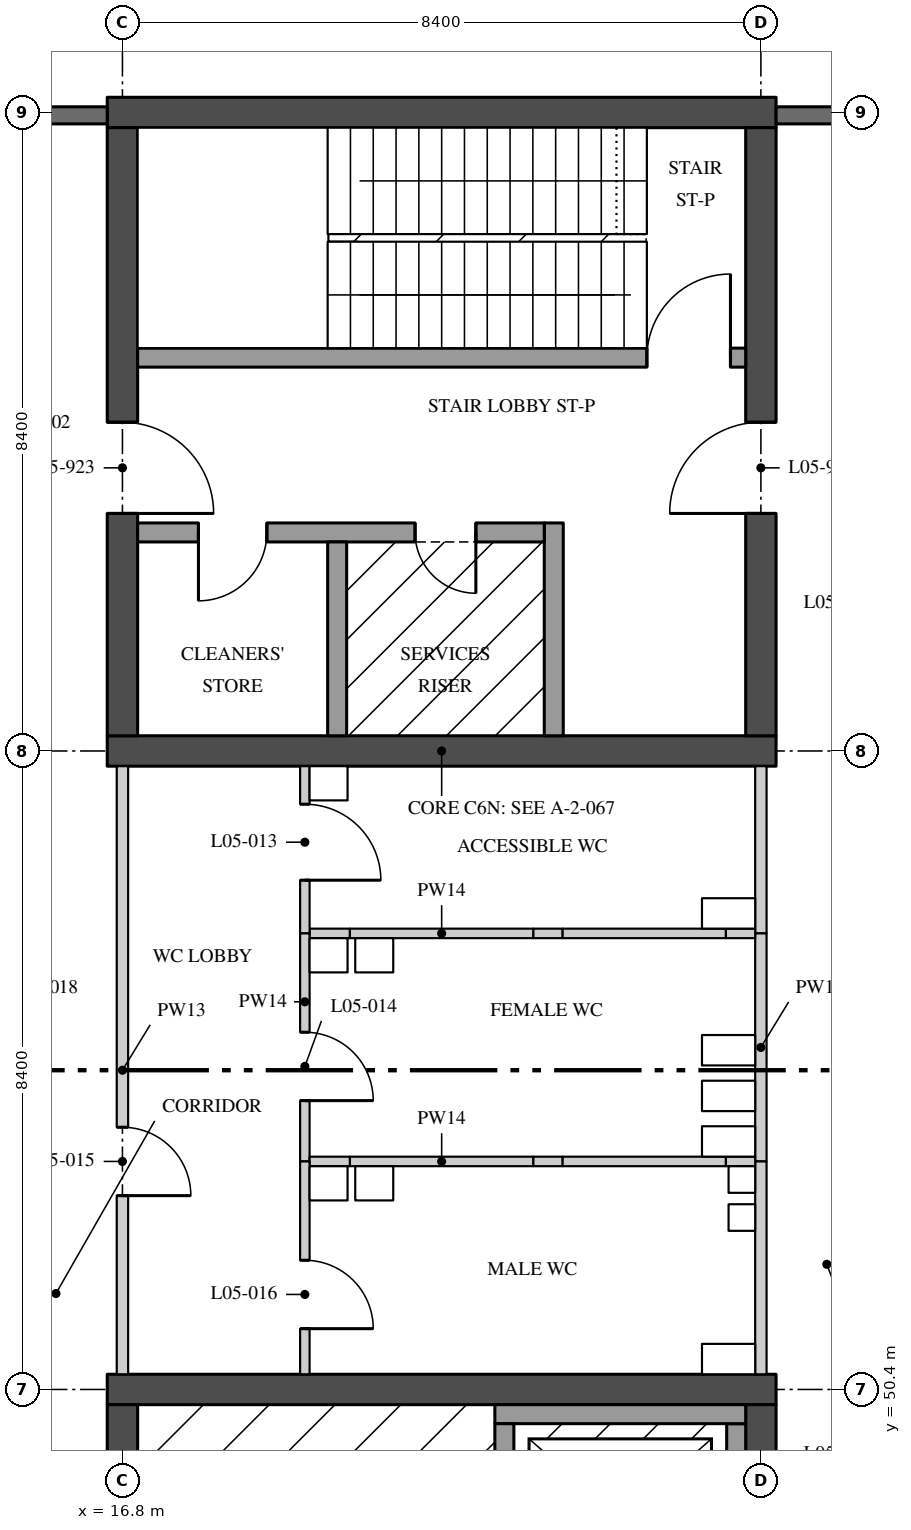
"""IFC4 building model, lengths in metres.
Left out: names, types, materials, properties, quantities, classifications, styles, units other than length and angle.
Written with IfcOpenShell. Run it as: python <this file> out.ifc"""

import sys

from ifc_helpers import new_model, si_unit, direction, frame, frame_2d, origin, place, context, subcontext, project, spatial, rectangle, extrude, element, fill, save


model = new_model("IFC4")
c1 = context("Model", 3, precision=1e-05, world=origin(), true_north=direction((0.0, 1.0)))
c2 = subcontext(c1, "Body", "Model", "MODEL_VIEW")
j1 = project(units=[si_unit("LENGTHUNIT", "METRE"), si_unit("PLANEANGLEUNIT", "RADIAN")], contexts=[c1])
p1 = place(None, origin())
s1 = spatial("IfcSite", under=j1, at=p1, CompositionType="ELEMENT")
p2 = place(p1, origin())
s2 = spatial("IfcBuilding", under=s1, at=p2, CompositionType="ELEMENT")
p3 = place(p2, frame((0.0, 0.0, 23.4)))
s3 = spatial("IfcBuildingStorey", under=s2, at=p3, CompositionType="ELEMENT", Elevation=23.4)
p4 = place(p3, frame((16.6, 50.4, 0.0), z_axis=(0.0, 0.0, 1.0), x_axis=(1.0, 0.0, 0.0)))
e1 = element("IfcWall", 1, at=p4, inside=s3, PredefinedType="SHEAR", context=c2, shape_type="SweptSolid", body=[
    extrude(rectangle(XDim=8.8, YDim=0.4, at=frame_2d((4.4, 0.0))), origin(), (0.0, 0.0, 1.0), 4.37),
])
p5 = place(p3, frame((16.8, 42.2, 0.0), z_axis=(0.0, 0.0, 1.0), x_axis=(0.0, 1.0, 0.0)))
e2 = element("IfcWall", 2, at=p5, inside=s3, PredefinedType="SHEAR", context=c2, shape_type="SweptSolid", body=[
    extrude(rectangle(XDim=8.0, YDim=0.4, at=frame_2d((4.0, 0.0))), origin(), (0.0, 0.0, 1.0), 4.37),
])
p6 = place(p5, frame((3.55, 0.0, 0.0)))
e3 = element("IfcOpeningElement", 3, at=p6, cuts=e2, PredefinedType="OPENING", context=c2, shape_type="SweptSolid", body=[
    extrude(rectangle(XDim=1.2, YDim=2.1, at=frame_2d((0.6, 1.05))), frame((0.0, 0.21, 0.0), z_axis=(0.0, -1.0, 0.0), x_axis=(1.0, 0.0, 0.0)), (0.0, 0.0, 1.0), 0.42),
])
p7 = place(p5, frame((0.8, 0.0, 0.0)))
e4 = element("IfcOpeningElement", 4, at=p7, cuts=e2, PredefinedType="OPENING", context=c2, shape_type="SweptSolid", body=[
    extrude(rectangle(XDim=1.2, YDim=2.1, at=frame_2d((0.6, 1.05))), frame((0.0, 0.21, 0.0), z_axis=(0.0, -1.0, 0.0), x_axis=(1.0, 0.0, 0.0)), (0.0, 0.0, 1.0), 0.42),
])
p8 = place(p3, frame((25.2, 42.2, 0.0), z_axis=(0.0, 0.0, 1.0), x_axis=(0.0, 1.0, 0.0)))
e5 = element("IfcWall", 5, at=p8, inside=s3, PredefinedType="SHEAR", context=c2, shape_type="SweptSolid", body=[
    extrude(rectangle(XDim=8.0, YDim=0.4, at=frame_2d((4.0, 0.0))), origin(), (0.0, 0.0, 1.0), 4.37),
])
p9 = place(p8, frame((3.55, 0.0, 0.0)))
e6 = element("IfcOpeningElement", 6, at=p9, cuts=e5, PredefinedType="OPENING", context=c2, shape_type="SweptSolid", body=[
    extrude(rectangle(XDim=1.2, YDim=2.1, at=frame_2d((0.6, 1.05))), frame((0.0, 0.21, 0.0), z_axis=(0.0, -1.0, 0.0), x_axis=(1.0, 0.0, 0.0)), (0.0, 0.0, 1.0), 0.42),
])
for number, where, z_axis, x_axis in (
    (7, (16.6, 58.8, 0.0), (0.0, 0.0, 1.0), (1.0, 0.0, 0.0)),
    (8, (16.6, 67.2, 0.0), (0.0, 0.0, 1.0), (1.0, 0.0, 0.0)),
):
    element("IfcWall", number, at=place(p3, frame(where, z_axis=z_axis, x_axis=x_axis)), inside=s3, PredefinedType="SHEAR", context=c2, shape_type="SweptSolid", body=[
        extrude(rectangle(XDim=8.8, YDim=0.4, at=frame_2d((4.4, 0.0))), origin(), (0.0, 0.0, 1.0), 4.37),
    ])
p10 = place(p3, frame((16.8, 59.0, 0.0), z_axis=(0.0, 0.0, 1.0), x_axis=(0.0, 1.0, 0.0)))
e9 = element("IfcWall", 9, at=p10, inside=s3, PredefinedType="SHEAR", context=c2, shape_type="SweptSolid", body=[
    extrude(rectangle(XDim=8.0, YDim=0.4, at=frame_2d((4.0, 0.0))), origin(), (0.0, 0.0, 1.0), 4.37),
])
p11 = place(p10, frame((2.925, 0.0, 0.0)))
e10 = element("IfcOpeningElement", 10, at=p11, cuts=e9, PredefinedType="OPENING", context=c2, shape_type="SweptSolid", body=[
    extrude(rectangle(XDim=1.2, YDim=2.1, at=frame_2d((0.6, 1.05))), frame((0.0, 0.21, 0.0), z_axis=(0.0, -1.0, 0.0), x_axis=(1.0, 0.0, 0.0)), (0.0, 0.0, 1.0), 0.42),
])
p12 = place(p3, frame((25.2, 59.0, 0.0), z_axis=(0.0, 0.0, 1.0), x_axis=(0.0, 1.0, 0.0)))
e11 = element("IfcWall", 11, at=p12, inside=s3, PredefinedType="SHEAR", context=c2, shape_type="SweptSolid", body=[
    extrude(rectangle(XDim=8.0, YDim=0.4, at=frame_2d((4.0, 0.0))), origin(), (0.0, 0.0, 1.0), 4.37),
])
p13 = place(p12, frame((2.925, 0.0, 0.0)))
e12 = element("IfcOpeningElement", 12, at=p13, cuts=e11, PredefinedType="OPENING", context=c2, shape_type="SweptSolid", body=[
    extrude(rectangle(XDim=1.2, YDim=2.1, at=frame_2d((0.6, 1.05))), frame((0.0, 0.21, 0.0), z_axis=(0.0, -1.0, 0.0), x_axis=(1.0, 0.0, 0.0)), (0.0, 0.0, 1.0), 0.42),
])
p14 = place(p3, frame((25.0, 63.975, 0.0), z_axis=(0.0, 0.0, 1.0), x_axis=(-1.0, 0.0, 0.0)))
e13 = element("IfcWall", 13, at=p14, inside=s3, PredefinedType="SOLIDWALL", context=c2, shape_type="SweptSolid", body=[
    extrude(rectangle(XDim=8.0, YDim=0.25, at=frame_2d((4.0, 0.0))), origin(), (0.0, 0.0, 1.0), 4.37),
])
p15 = place(p14, frame((0.2, 0.0, 0.0)))
e14 = element("IfcOpeningElement", 14, at=p15, cuts=e13, PredefinedType="OPENING", context=c2, shape_type="SweptSolid", body=[
    extrude(rectangle(XDim=1.1, YDim=2.1, at=frame_2d((0.55, 1.05))), frame((0.0, 0.135, 0.0), z_axis=(0.0, -1.0, 0.0), x_axis=(1.0, 0.0, 0.0)), (0.0, 0.0, 1.0), 0.27),
])
p16 = place(p3, frame((22.475, 61.8, 0.0), z_axis=(0.0, 0.0, 1.0), x_axis=(0.0, -1.0, 0.0)))
e15 = element("IfcWall", 15, at=p16, inside=s3, PredefinedType="SOLIDWALL", context=c2, shape_type="SweptSolid", body=[
    extrude(rectangle(XDim=2.8, YDim=0.25, at=frame_2d((1.4, 0.0))), origin(), (0.0, 0.0, 1.0), 4.37),
])
p17 = place(p3, frame((22.35, 61.675, 0.0), z_axis=(0.0, 0.0, 1.0), x_axis=(-1.0, 0.0, 0.0)))
e16 = element("IfcWall", 16, at=p17, inside=s3, PredefinedType="SOLIDWALL", context=c2, shape_type="SweptSolid", body=[
    extrude(rectangle(XDim=5.35, YDim=0.25, at=frame_2d((2.675, 0.0))), origin(), (0.0, 0.0, 1.0), 4.37),
])
p18 = place(p17, frame((3.65, 0.0, 0.0)))
e17 = element("IfcOpeningElement", 17, at=p18, cuts=e16, PredefinedType="OPENING", context=c2, shape_type="SweptSolid", body=[
    extrude(rectangle(XDim=0.9, YDim=2.1, at=frame_2d((0.45, 1.05))), frame((0.0, 0.135, 0.0), z_axis=(0.0, -1.0, 0.0), x_axis=(1.0, 0.0, 0.0)), (0.0, 0.0, 1.0), 0.27),
])
p19 = place(p17, frame((0.9, 0.0, 0.0)))
e18 = element("IfcOpeningElement", 18, at=p19, cuts=e16, PredefinedType="OPENING", context=c2, shape_type="SweptSolid", body=[
    extrude(rectangle(XDim=0.8, YDim=2.1, at=frame_2d((0.4, 1.05))), frame((0.0, 0.135, 0.0), z_axis=(0.0, -1.0, 0.0), x_axis=(1.0, 0.0, 0.0)), (0.0, 0.0, 1.0), 0.27),
])
p20 = place(p3, frame((19.625, 61.55, 0.0), z_axis=(0.0, 0.0, 1.0), x_axis=(0.0, -1.0, 0.0)))
e19 = element("IfcWall", 19, at=p20, inside=s3, PredefinedType="SOLIDWALL", context=c2, shape_type="SweptSolid", body=[
    extrude(rectangle(XDim=2.55, YDim=0.25, at=frame_2d((1.275, 0.0))), origin(), (0.0, 0.0, 1.0), 4.37),
])
p21 = place(p3, frame((24.875, 47.65, 0.0), z_axis=(0.0, 0.0, 1.0), x_axis=(0.0, 1.0, 0.0)))
e20 = element("IfcWall", 20, at=p21, inside=s3, PredefinedType="SOLIDWALL", context=c2, shape_type="SweptSolid", body=[
    extrude(rectangle(XDim=2.3, YDim=0.25, at=frame_2d((1.15, 0.0))), origin(), (0.0, 0.0, 1.0), 4.37),
])
p22 = place(p3, frame((21.7, 50.075, 0.0), z_axis=(0.0, 0.0, 1.0), x_axis=(1.0, 0.0, 0.0)))
e21 = element("IfcWall", 21, at=p22, inside=s3, PredefinedType="SOLIDWALL", context=c2, shape_type="SweptSolid", body=[
    extrude(rectangle(XDim=3.3, YDim=0.25, at=frame_2d((1.65, 0.0))), origin(), (0.0, 0.0, 1.0), 4.37),
])
p23 = place(p3, frame((21.825, 47.65, 0.0), z_axis=(0.0, 0.0, 1.0), x_axis=(0.0, 1.0, 0.0)))
e22 = element("IfcWall", 22, at=p23, inside=s3, PredefinedType="SOLIDWALL", context=c2, shape_type="SweptSolid", body=[
    extrude(rectangle(XDim=2.3, YDim=0.25, at=frame_2d((1.15, 0.0))), origin(), (0.0, 0.0, 1.0), 4.37),
])
p24 = place(p3, frame((25.2, 56.4, 0.0), z_axis=(0.0, 0.0, 1.0), x_axis=(0.0, 1.0, 0.0)))
e23 = element("IfcWall", 23, at=p24, inside=s3, PredefinedType="PARTITIONING", context=c2, shape_type="SweptSolid", body=[
    extrude(rectangle(XDim=2.2, YDim=0.15, at=frame_2d((1.1, 0.0))), origin(), (0.0, 0.0, 1.0), 3.817),
])
p25 = place(p3, frame((25.2, 53.4, 0.0), z_axis=(0.0, 0.0, 1.0), x_axis=(0.0, 1.0, 0.0)))
e24 = element("IfcWall", 24, at=p25, inside=s3, PredefinedType="PARTITIONING", context=c2, shape_type="SweptSolid", body=[
    extrude(rectangle(XDim=3.0, YDim=0.15, at=frame_2d((1.5, 0.0))), origin(), (0.0, 0.0, 1.0), 3.817),
])
p26 = place(p3, frame((25.2, 50.6, 0.0), z_axis=(0.0, 0.0, 1.0), x_axis=(0.0, 1.0, 0.0)))
e25 = element("IfcWall", 25, at=p26, inside=s3, PredefinedType="PARTITIONING", context=c2, shape_type="SweptSolid", body=[
    extrude(rectangle(XDim=2.8, YDim=0.15, at=frame_2d((1.4, 0.0))), origin(), (0.0, 0.0, 1.0), 3.817),
])
p27 = place(p3, frame((16.8, 50.6, 0.0), z_axis=(0.0, 0.0, 1.0), x_axis=(0.0, 1.0, 0.0)))
e26 = element("IfcWall", 26, at=p27, inside=s3, PredefinedType="PARTITIONING", context=c2, shape_type="SweptSolid", body=[
    extrude(rectangle(XDim=8.0, YDim=0.15, at=frame_2d((4.0, 0.0))), origin(), (0.0, 0.0, 1.0), 3.817),
])
p28 = place(p27, frame((2.35, 0.0, 0.0)))
e27 = element("IfcOpeningElement", 27, at=p28, cuts=e26, PredefinedType="OPENING", context=c2, shape_type="SweptSolid", body=[
    extrude(rectangle(XDim=0.9, YDim=2.1, at=frame_2d((0.45, 1.05))), frame((0.0, 0.085, 0.0), z_axis=(0.0, -1.0, 0.0), x_axis=(1.0, 0.0, 0.0)), (0.0, 0.0, 1.0), 0.17),
])
p29 = place(p3, frame((19.262, 56.4, 0.0), z_axis=(0.0, 0.0, 1.0), x_axis=(1.0, 0.0, 0.0)))
e28 = element("IfcWall", 28, at=p29, inside=s3, PredefinedType="PARTITIONING", context=c2, shape_type="SweptSolid", body=[
    extrude(rectangle(XDim=0.531, YDim=0.125, at=frame_2d((0.266, 0.0))), origin(), (0.0, 0.0, 1.0), 3.946),
])
p30 = place(p3, frame((19.793, 56.4, 0.0), z_axis=(0.0, 0.0, 1.0), x_axis=(1.0, 0.0, 0.0)))
e29 = element("IfcWall", 29, at=p30, inside=s3, PredefinedType="PARTITIONING", context=c2, shape_type="SweptSolid", body=[
    extrude(rectangle(XDim=2.414, YDim=0.125, at=frame_2d((1.207, 0.0))), origin(), (0.0, 0.0, 1.0), 4.37),
])
p31 = place(p3, frame((22.207, 56.4, 0.0), z_axis=(0.0, 0.0, 1.0), x_axis=(1.0, 0.0, 0.0)))
e30 = element("IfcWall", 30, at=p31, inside=s3, PredefinedType="PARTITIONING", context=c2, shape_type="SweptSolid", body=[
    extrude(rectangle(XDim=0.385, YDim=0.125, at=frame_2d((0.192, 0.0))), origin(), (0.0, 0.0, 1.0), 3.946),
])
p32 = place(p3, frame((22.592, 56.4, 0.0), z_axis=(0.0, 0.0, 1.0), x_axis=(1.0, 0.0, 0.0)))
e31 = element("IfcWall", 31, at=p32, inside=s3, PredefinedType="PARTITIONING", context=c2, shape_type="SweptSolid", body=[
    extrude(rectangle(XDim=2.148, YDim=0.125, at=frame_2d((1.074, 0.0))), origin(), (0.0, 0.0, 1.0), 4.37),
])
p33 = place(p3, frame((24.74, 56.4, 0.0), z_axis=(0.0, 0.0, 1.0), x_axis=(1.0, 0.0, 0.0)))
e32 = element("IfcWall", 32, at=p33, inside=s3, PredefinedType="PARTITIONING", context=c2, shape_type="SweptSolid", body=[
    extrude(rectangle(XDim=0.385, YDim=0.125, at=frame_2d((0.192, 0.0))), origin(), (0.0, 0.0, 1.0), 3.817),
])
p34 = place(p3, frame((19.2, 56.4, 0.0), z_axis=(0.0, 0.0, 1.0), x_axis=(0.0, 1.0, 0.0)))
e33 = element("IfcWall", 33, at=p34, inside=s3, PredefinedType="PARTITIONING", context=c2, shape_type="SweptSolid", body=[
    extrude(rectangle(XDim=2.2, YDim=0.125, at=frame_2d((1.1, 0.0))), origin(), (0.0, 0.0, 1.0), 4.37),
])
p35 = place(p34, frame((0.7, 0.0, 0.0)))
e34 = element("IfcOpeningElement", 34, at=p35, cuts=e33, PredefinedType="OPENING", context=c2, shape_type="SweptSolid", body=[
    extrude(rectangle(XDim=1.0, YDim=2.1, at=frame_2d((0.5, 1.05))), frame((0.0, 0.073, 0.0), z_axis=(0.0, -1.0, 0.0), x_axis=(1.0, 0.0, 0.0)), (0.0, 0.0, 1.0), 0.145),
])
p36 = place(p3, frame((19.2, 53.4, 0.0), z_axis=(0.0, 0.0, 1.0), x_axis=(0.0, 1.0, 0.0)))
e35 = element("IfcWall", 35, at=p36, inside=s3, PredefinedType="PARTITIONING", context=c2, shape_type="SweptSolid", body=[
    extrude(rectangle(XDim=3.0, YDim=0.125, at=frame_2d((1.5, 0.0))), origin(), (0.0, 0.0, 1.0), 4.37),
])
p37 = place(p36, frame((0.8, 0.0, 0.0)))
e36 = element("IfcOpeningElement", 36, at=p37, cuts=e35, PredefinedType="OPENING", context=c2, shape_type="SweptSolid", body=[
    extrude(rectangle(XDim=0.9, YDim=2.1, at=frame_2d((0.45, 1.05))), frame((0.0, 0.073, 0.0), z_axis=(0.0, -1.0, 0.0), x_axis=(1.0, 0.0, 0.0)), (0.0, 0.0, 1.0), 0.145),
])
p38 = place(p3, frame((19.262, 53.4, 0.0), z_axis=(0.0, 0.0, 1.0), x_axis=(1.0, 0.0, 0.0)))
e37 = element("IfcWall", 37, at=p38, inside=s3, PredefinedType="PARTITIONING", context=c2, shape_type="SweptSolid", body=[
    extrude(rectangle(XDim=0.531, YDim=0.125, at=frame_2d((0.266, 0.0))), origin(), (0.0, 0.0, 1.0), 3.946),
])
p39 = place(p3, frame((19.793, 53.4, 0.0), z_axis=(0.0, 0.0, 1.0), x_axis=(1.0, 0.0, 0.0)))
e38 = element("IfcWall", 38, at=p39, inside=s3, PredefinedType="PARTITIONING", context=c2, shape_type="SweptSolid", body=[
    extrude(rectangle(XDim=2.414, YDim=0.125, at=frame_2d((1.207, 0.0))), origin(), (0.0, 0.0, 1.0), 4.37),
])
p40 = place(p3, frame((22.207, 53.4, 0.0), z_axis=(0.0, 0.0, 1.0), x_axis=(1.0, 0.0, 0.0)))
e39 = element("IfcWall", 39, at=p40, inside=s3, PredefinedType="PARTITIONING", context=c2, shape_type="SweptSolid", body=[
    extrude(rectangle(XDim=0.385, YDim=0.125, at=frame_2d((0.192, 0.0))), origin(), (0.0, 0.0, 1.0), 3.946),
])
p41 = place(p3, frame((22.592, 53.4, 0.0), z_axis=(0.0, 0.0, 1.0), x_axis=(1.0, 0.0, 0.0)))
e40 = element("IfcWall", 40, at=p41, inside=s3, PredefinedType="PARTITIONING", context=c2, shape_type="SweptSolid", body=[
    extrude(rectangle(XDim=2.148, YDim=0.125, at=frame_2d((1.074, 0.0))), origin(), (0.0, 0.0, 1.0), 4.37),
])
p42 = place(p3, frame((24.74, 53.4, 0.0), z_axis=(0.0, 0.0, 1.0), x_axis=(1.0, 0.0, 0.0)))
e41 = element("IfcWall", 41, at=p42, inside=s3, PredefinedType="PARTITIONING", context=c2, shape_type="SweptSolid", body=[
    extrude(rectangle(XDim=0.385, YDim=0.125, at=frame_2d((0.192, 0.0))), origin(), (0.0, 0.0, 1.0), 3.817),
])
p43 = place(p3, frame((19.2, 50.6, 0.0), z_axis=(0.0, 0.0, 1.0), x_axis=(0.0, 1.0, 0.0)))
e42 = element("IfcWall", 42, at=p43, inside=s3, PredefinedType="PARTITIONING", context=c2, shape_type="SweptSolid", body=[
    extrude(rectangle(XDim=2.8, YDim=0.125, at=frame_2d((1.4, 0.0))), origin(), (0.0, 0.0, 1.0), 4.37),
])
p44 = place(p43, frame((0.6, 0.0, 0.0)))
e43 = element("IfcOpeningElement", 43, at=p44, cuts=e42, PredefinedType="OPENING", context=c2, shape_type="SweptSolid", body=[
    extrude(rectangle(XDim=0.9, YDim=2.1, at=frame_2d((0.45, 1.05))), frame((0.0, 0.073, 0.0), z_axis=(0.0, -1.0, 0.0), x_axis=(1.0, 0.0, 0.0)), (0.0, 0.0, 1.0), 0.145),
])
p45 = place(p3, frame((33.594, 67.163, 0.0), z_axis=(0.0, 0.0, 1.0), x_axis=(-1.0, 0.0, 0.0)))
e44 = element("IfcWall", 44, at=p45, inside=s3, PredefinedType="SOLIDWALL", context=c2, shape_type="SweptSolid", body=[
    extrude(rectangle(XDim=8.195, YDim=0.225, at=frame_2d((4.097, 0.0))), origin(), (0.0, 0.0, 1.0), 3.819),
])
p46 = place(p45, frame((1.495, 0.0, 0.6)))
e45 = element("IfcOpeningElement", 45, at=p46, cuts=e44, PredefinedType="OPENING", context=c2, shape_type="SweptSolid", body=[
    extrude(rectangle(XDim=1.2, YDim=2.1, at=frame_2d((0.6, 1.05))), frame((0.0, 0.123, 0.0), z_axis=(0.0, -1.0, 0.0), x_axis=(1.0, 0.0, 0.0)), (0.0, 0.0, 1.0), 0.245),
])
p47 = place(p3, frame((16.6, 67.163, 0.0), z_axis=(0.0, 0.0, 1.0), x_axis=(-1.0, 0.0, 0.0)))
e46 = element("IfcWall", 46, at=p47, inside=s3, PredefinedType="SOLIDWALL", context=c2, shape_type="SweptSolid", body=[
    extrude(rectangle(XDim=8.195, YDim=0.225, at=frame_2d((4.097, 0.0))), origin(), (0.0, 0.0, 1.0), 3.819),
])
p48 = place(p47, frame((4.9, 0.0, 0.6)))
e47 = element("IfcOpeningElement", 47, at=p48, cuts=e46, PredefinedType="OPENING", context=c2, shape_type="SweptSolid", body=[
    extrude(rectangle(XDim=2.4, YDim=2.1, at=frame_2d((1.2, 1.05))), frame((0.0, 0.123, 0.0), z_axis=(0.0, -1.0, 0.0), x_axis=(1.0, 0.0, 0.0)), (0.0, 0.0, 1.0), 0.245),
])
p49 = place(p18, origin())
e48 = element("IfcDoor", 48, at=p49, inside=s3, OperationType="SINGLE_SWING_LEFT", PredefinedType="DOOR", context=c2, shape_type="SweptSolid", body=[
    extrude(rectangle(XDim=0.9, YDim=2.1, at=frame_2d((0.45, 1.05))), frame((0.0, 0.035, 0.0), z_axis=(0.0, -1.0, 0.0), x_axis=(1.0, 0.0, 0.0)), (0.0, 0.0, 1.0), 0.07),
])
fill(e17, e48)
p50 = place(p11, frame((1.2, 0.0, 0.0), z_axis=(0.0, 0.0, 1.0), x_axis=(-1.0, 0.0, 0.0)))
e49 = element("IfcDoor", 49, at=p50, inside=s3, OperationType="SINGLE_SWING_LEFT", PredefinedType="DOOR", context=c2, shape_type="SweptSolid", body=[
    extrude(rectangle(XDim=1.2, YDim=2.1, at=frame_2d((0.6, 1.05))), frame((0.0, 0.035, 0.0), z_axis=(0.0, -1.0, 0.0), x_axis=(1.0, 0.0, 0.0)), (0.0, 0.0, 1.0), 0.07),
])
fill(e10, e49)
p51 = place(p13, origin())
e50 = element("IfcDoor", 50, at=p51, inside=s3, OperationType="SINGLE_SWING_RIGHT", PredefinedType="DOOR", context=c2, shape_type="SweptSolid", body=[
    extrude(rectangle(XDim=1.2, YDim=2.1, at=frame_2d((0.6, 1.05))), frame((0.0, 0.035, 0.0), z_axis=(0.0, -1.0, 0.0), x_axis=(1.0, 0.0, 0.0)), (0.0, 0.0, 1.0), 0.07),
])
fill(e12, e50)
p52 = place(p19, origin())
e51 = element("IfcDoor", 51, at=p52, inside=s3, OperationType="SINGLE_SWING_RIGHT", PredefinedType="DOOR", context=c2, shape_type="SweptSolid", body=[
    extrude(rectangle(XDim=0.8, YDim=2.1, at=frame_2d((0.4, 1.05))), frame((0.0, 0.035, 0.0), z_axis=(0.0, -1.0, 0.0), x_axis=(1.0, 0.0, 0.0)), (0.0, 0.0, 1.0), 0.07),
])
fill(e18, e51)
p53 = place(p15, frame((1.1, 0.0, 0.0), z_axis=(0.0, 0.0, 1.0), x_axis=(-1.0, 0.0, 0.0)))
e52 = element("IfcDoor", 52, at=p53, inside=s3, OperationType="SINGLE_SWING_LEFT", PredefinedType="DOOR", context=c2, shape_type="SweptSolid", body=[
    extrude(rectangle(XDim=1.1, YDim=2.1, at=frame_2d((0.55, 1.05))), frame((0.0, 0.035, 0.0), z_axis=(0.0, -1.0, 0.0), x_axis=(1.0, 0.0, 0.0)), (0.0, 0.0, 1.0), 0.07),
])
fill(e14, e52)
p54 = place(p35, frame((1.0, 0.0, 0.0), z_axis=(0.0, 0.0, 1.0), x_axis=(-1.0, 0.0, 0.0)))
e53 = element("IfcDoor", 53, at=p54, inside=s3, OperationType="SINGLE_SWING_LEFT", PredefinedType="DOOR", context=c2, shape_type="SweptSolid", body=[
    extrude(rectangle(XDim=1.0, YDim=2.1, at=frame_2d((0.5, 1.05))), frame((0.0, 0.02, 0.0), z_axis=(0.0, -1.0, 0.0), x_axis=(1.0, 0.0, 0.0)), (0.0, 0.0, 1.0), 0.04),
])
fill(e34, e53)
p55 = place(p37, frame((0.9, 0.0, 0.0), z_axis=(0.0, 0.0, 1.0), x_axis=(-1.0, 0.0, 0.0)))
e54 = element("IfcDoor", 54, at=p55, inside=s3, OperationType="SINGLE_SWING_LEFT", PredefinedType="DOOR", context=c2, shape_type="SweptSolid", body=[
    extrude(rectangle(XDim=0.9, YDim=2.1, at=frame_2d((0.45, 1.05))), frame((0.0, 0.02, 0.0), z_axis=(0.0, -1.0, 0.0), x_axis=(1.0, 0.0, 0.0)), (0.0, 0.0, 1.0), 0.04),
])
fill(e36, e54)
p56 = place(p28, frame((0.9, 0.0, 0.0), z_axis=(0.0, 0.0, 1.0), x_axis=(-1.0, 0.0, 0.0)))
e55 = element("IfcDoor", 55, at=p56, inside=s3, OperationType="SINGLE_SWING_LEFT", PredefinedType="DOOR", context=c2, shape_type="SweptSolid", body=[
    extrude(rectangle(XDim=0.9, YDim=2.1, at=frame_2d((0.45, 1.05))), frame((0.0, 0.025, 0.0), z_axis=(0.0, -1.0, 0.0), x_axis=(1.0, 0.0, 0.0)), (0.0, 0.0, 1.0), 0.05),
])
fill(e27, e55)
p57 = place(p44, frame((0.9, 0.0, 0.0), z_axis=(0.0, 0.0, 1.0), x_axis=(-1.0, 0.0, 0.0)))
e56 = element("IfcDoor", 56, at=p57, inside=s3, OperationType="SINGLE_SWING_LEFT", PredefinedType="DOOR", context=c2, shape_type="SweptSolid", body=[
    extrude(rectangle(XDim=0.9, YDim=2.1, at=frame_2d((0.45, 1.05))), frame((0.0, 0.02, 0.0), z_axis=(0.0, -1.0, 0.0), x_axis=(1.0, 0.0, 0.0)), (0.0, 0.0, 1.0), 0.04),
])
fill(e43, e56)
save(model, sys.argv[1])
